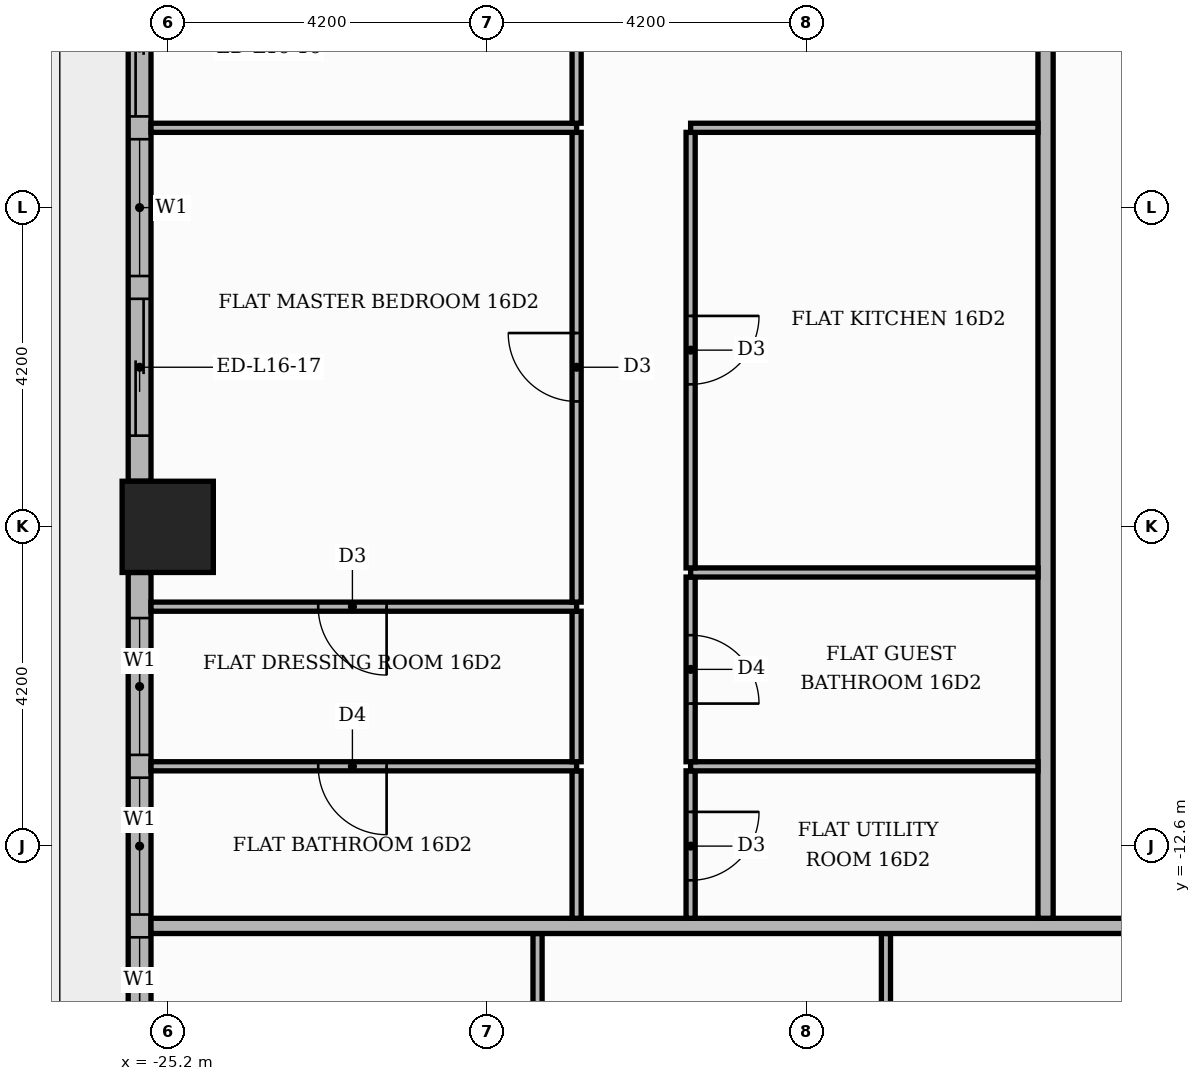
"""IFC4 building model, lengths in metres.
Left out: names, types, materials, properties, quantities, classifications, styles, units other than length and angle.
Written with IfcOpenShell. Run it as: python <this file> out.ifc"""

import sys

from ifc_helpers import new_model, si_unit, direction, frame, frame_2d, origin, origin_2d, place, context, subcontext, project, spatial, rectangle, extrude, element, fill, save


model = new_model("IFC4")
c1 = context("Model", 3, precision=1e-05, world=origin(), true_north=direction((0.0, 1.0)))
c2 = subcontext(c1, "Body", "Model", "MODEL_VIEW")
j1 = project(units=[si_unit("LENGTHUNIT", "METRE"), si_unit("PLANEANGLEUNIT", "RADIAN")], contexts=[c1])
p1 = place(None, origin())
s1 = spatial("IfcSite", under=j1, at=p1, CompositionType="ELEMENT")
p2 = place(p1, origin())
s2 = spatial("IfcBuilding", under=s1, at=p2, CompositionType="ELEMENT")
p3 = place(p2, frame((0.0, 0.0, 69.9)))
s3 = spatial("IfcBuildingStorey", under=s2, at=p3, CompositionType="ELEMENT", Elevation=69.9)
p4 = place(p3, frame((-25.2, -8.4, 0.0), z_axis=(0.0, 0.0, 1.0), x_axis=(1.0, 0.0, 0.0)))
e1 = element("IfcColumn", 1, at=p4, inside=s3, PredefinedType="COLUMN", context=c2, shape_type="SweptSolid", body=[
    extrude(rectangle(XDim=1.2, YDim=1.2, at=origin_2d()), origin(), (0.0, 0.0, 1.0), 3.9),
])
p5 = place(p3, frame((-25.57, -0.6, 0.0), z_axis=(0.0, 0.0, 1.0), x_axis=(0.0, -1.0, 0.0)))
e2 = element("IfcWall", 2, at=p5, inside=s3, PredefinedType="STANDARD", context=c2, shape_type="SweptSolid", body=[
    extrude(rectangle(XDim=7.2, YDim=0.3, at=frame_2d((3.6, 0.0))), origin(), (0.0, 0.0, 1.0), 3.4),
])
p6 = place(p5, frame((0.6, 0.0, 0.0)))
e3 = element("IfcOpeningElement", 3, at=p6, cuts=e2, PredefinedType="OPENING", context=c2, shape_type="SweptSolid", body=[
    extrude(rectangle(XDim=1.8, YDim=2.4, at=frame_2d((0.9, 1.2))), frame((0.0, 0.16, 0.0), z_axis=(0.0, -1.0, 0.0), x_axis=(1.0, 0.0, 0.0)), (0.0, 0.0, 1.0), 0.32),
])
p7 = place(p5, frame((2.7, 0.0, 0.9)))
e4 = element("IfcOpeningElement", 4, at=p7, cuts=e2, PredefinedType="OPENING", context=c2, shape_type="SweptSolid", body=[
    extrude(rectangle(XDim=1.8, YDim=2.1, at=frame_2d((0.9, 1.05))), frame((0.0, 0.16, 0.0), z_axis=(0.0, -1.0, 0.0), x_axis=(1.0, 0.0, 0.0)), (0.0, 0.0, 1.0), 0.32),
])
p8 = place(p5, frame((4.8, 0.0, 0.0)))
e5 = element("IfcOpeningElement", 5, at=p8, cuts=e2, PredefinedType="OPENING", context=c2, shape_type="SweptSolid", body=[
    extrude(rectangle(XDim=1.8, YDim=2.4, at=frame_2d((0.9, 1.2))), frame((0.0, 0.16, 0.0), z_axis=(0.0, -1.0, 0.0), x_axis=(1.0, 0.0, 0.0)), (0.0, 0.0, 1.0), 0.32),
])
p9 = place(p3, frame((-25.57, -9.0, 0.0), z_axis=(0.0, 0.0, 1.0), x_axis=(0.0, -1.0, 0.0)))
e6 = element("IfcWall", 6, at=p9, inside=s3, PredefinedType="STANDARD", context=c2, shape_type="SweptSolid", body=[
    extrude(rectangle(XDim=7.2, YDim=0.3, at=frame_2d((3.6, 0.0))), origin(), (0.0, 0.0, 1.0), 3.4),
])
p10 = place(p9, frame((0.6, 0.0, 0.9)))
e7 = element("IfcOpeningElement", 7, at=p10, cuts=e6, PredefinedType="OPENING", context=c2, shape_type="SweptSolid", body=[
    extrude(rectangle(XDim=1.8, YDim=2.1, at=frame_2d((0.9, 1.05))), frame((0.0, 0.16, 0.0), z_axis=(0.0, -1.0, 0.0), x_axis=(1.0, 0.0, 0.0)), (0.0, 0.0, 1.0), 0.32),
])
p11 = place(p9, frame((2.7, 0.0, 0.9)))
e8 = element("IfcOpeningElement", 8, at=p11, cuts=e6, PredefinedType="OPENING", context=c2, shape_type="SweptSolid", body=[
    extrude(rectangle(XDim=1.8, YDim=2.1, at=frame_2d((0.9, 1.05))), frame((0.0, 0.16, 0.0), z_axis=(0.0, -1.0, 0.0), x_axis=(1.0, 0.0, 0.0)), (0.0, 0.0, 1.0), 0.32),
])
p12 = place(p9, frame((4.8, 0.0, 0.9)))
e9 = element("IfcOpeningElement", 9, at=p12, cuts=e6, PredefinedType="OPENING", context=c2, shape_type="SweptSolid", body=[
    extrude(rectangle(XDim=1.8, YDim=2.1, at=frame_2d((0.9, 1.05))), frame((0.0, 0.16, 0.0), z_axis=(0.0, -1.0, 0.0), x_axis=(1.0, 0.0, 0.0)), (0.0, 0.0, 1.0), 0.32),
])
p13 = place(p3, frame((-20.334, -20.66, 0.0), z_axis=(0.0, 0.0, 1.0), x_axis=(0.0, 1.0, 0.0)))
e10 = element("IfcWall", 10, at=p13, inside=s3, PredefinedType="PARTITIONING", context=c2, shape_type="SweptSolid", body=[
    extrude(rectangle(XDim=6.91, YDim=0.12, at=frame_2d((3.455, 0.0))), origin(), (0.0, 0.0, 1.0), 3.4),
])
p14 = place(p13, frame((4.792, 0.0, 0.0)))
e11 = element("IfcOpeningElement", 11, at=p14, cuts=e10, PredefinedType="OPENING", context=c2, shape_type="SweptSolid", body=[
    extrude(rectangle(XDim=0.9, YDim=2.1, at=frame_2d((0.45, 1.05))), frame((0.0, 0.07, 0.0), z_axis=(0.0, -1.0, 0.0), x_axis=(1.0, 0.0, 0.0)), (0.0, 0.0, 1.0), 0.14),
])
p15 = place(p3, frame((-15.75, -20.66, 0.0), z_axis=(0.0, 0.0, 1.0), x_axis=(0.0, 1.0, 0.0)))
e12 = element("IfcWall", 12, at=p15, inside=s3, PredefinedType="PARTITIONING", context=c2, shape_type="SweptSolid", body=[
    extrude(rectangle(XDim=6.91, YDim=0.12, at=frame_2d((3.455, 0.0))), origin(), (0.0, 0.0, 1.0), 3.4),
])
p16 = place(p15, frame((2.975, 0.0, 0.0)))
e13 = element("IfcOpeningElement", 13, at=p16, cuts=e12, PredefinedType="OPENING", context=c2, shape_type="SweptSolid", body=[
    extrude(rectangle(XDim=1.0, YDim=2.1, at=frame_2d((0.5, 1.05))), frame((0.0, 0.07, 0.0), z_axis=(0.0, -1.0, 0.0), x_axis=(1.0, 0.0, 0.0)), (0.0, 0.0, 1.0), 0.14),
])
p17 = place(p3, frame((-25.42, -13.65, 0.0), z_axis=(0.0, 0.0, 1.0), x_axis=(1.0, 0.0, 0.0)))
e14 = element("IfcWall", 14, at=p17, inside=s3, PredefinedType="PARTITIONING", context=c2, shape_type="SweptSolid", body=[
    extrude(rectangle(XDim=39.07, YDim=0.2, at=frame_2d((19.535, 0.0))), origin(), (0.0, 0.0, 1.0), 3.4),
])
p18 = place(p17, frame((13.32, 0.0, 0.0)))
e15 = element("IfcOpeningElement", 15, at=p18, cuts=e14, PredefinedType="OPENING", context=c2, shape_type="SweptSolid", body=[
    extrude(rectangle(XDim=1.1, YDim=2.4, at=frame_2d((0.55, 1.2))), frame((0.0, 0.11, 0.0), z_axis=(0.0, -1.0, 0.0), x_axis=(1.0, 0.0, 0.0)), (0.0, 0.0, 1.0), 0.22),
])
p19 = place(p17, frame((21.72, 0.0, 0.0)))
e16 = element("IfcOpeningElement", 16, at=p19, cuts=e14, PredefinedType="OPENING", context=c2, shape_type="SweptSolid", body=[
    extrude(rectangle(XDim=1.1, YDim=2.4, at=frame_2d((0.55, 1.2))), frame((0.0, 0.11, 0.0), z_axis=(0.0, -1.0, 0.0), x_axis=(1.0, 0.0, 0.0)), (0.0, 0.0, 1.0), 0.22),
])
p20 = place(p3, frame((-19.82, -13.55, 0.0), z_axis=(0.0, 0.0, 1.0), x_axis=(0.0, 1.0, 0.0)))
e17 = element("IfcWall", 17, at=p20, inside=s3, PredefinedType="PARTITIONING", context=c2, shape_type="SweptSolid", body=[
    extrude(rectangle(XDim=1.94, YDim=0.12, at=frame_2d((0.97, 0.0))), origin(), (0.0, 0.0, 1.0), 3.4),
])
p21 = place(p3, frame((-18.32, -13.55, 0.0), z_axis=(0.0, 0.0, 1.0), x_axis=(0.0, 1.0, 0.0)))
e18 = element("IfcWall", 18, at=p21, inside=s3, PredefinedType="PARTITIONING", context=c2, shape_type="SweptSolid", body=[
    extrude(rectangle(XDim=1.94, YDim=0.12, at=frame_2d((0.97, 0.0))), origin(), (0.0, 0.0, 1.0), 3.4),
])
p22 = place(p21, frame((0.5, 0.0, 0.0)))
e19 = element("IfcOpeningElement", 19, at=p22, cuts=e18, PredefinedType="OPENING", context=c2, shape_type="SweptSolid", body=[
    extrude(rectangle(XDim=0.9, YDim=2.1, at=frame_2d((0.45, 1.05))), frame((0.0, 0.07, 0.0), z_axis=(0.0, -1.0, 0.0), x_axis=(1.0, 0.0, 0.0)), (0.0, 0.0, 1.0), 0.14),
])
p23 = place(p3, frame((-13.65, -13.55, 0.0), z_axis=(0.0, 0.0, 1.0), x_axis=(0.0, 1.0, 0.0)))
e20 = element("IfcWall", 20, at=p23, inside=s3, PredefinedType="PARTITIONING", context=c2, shape_type="SweptSolid", body=[
    extrude(rectangle(XDim=18.7, YDim=0.2, at=frame_2d((9.35, 0.0))), origin(), (0.0, 0.0, 1.0), 3.4),
])
p24 = place(p23, frame((11.95, 0.0, 0.0)))
e21 = element("IfcOpeningElement", 21, at=p24, cuts=e20, PredefinedType="OPENING", context=c2, shape_type="SweptSolid", body=[
    extrude(rectangle(XDim=1.1, YDim=2.4, at=frame_2d((0.55, 1.2))), frame((0.0, 0.11, 0.0), z_axis=(0.0, -1.0, 0.0), x_axis=(1.0, 0.0, 0.0)), (0.0, 0.0, 1.0), 0.22),
])
p25 = place(p3, frame((-25.42, -11.55, 0.0), z_axis=(0.0, 0.0, 1.0), x_axis=(1.0, 0.0, 0.0)))
e22 = element("IfcWall", 22, at=p25, inside=s3, PredefinedType="PARTITIONING", context=c2, shape_type="SweptSolid", body=[
    extrude(rectangle(XDim=5.6, YDim=0.12, at=frame_2d((2.8, 0.0))), origin(), (0.0, 0.0, 1.0), 3.4),
])
p26 = place(p25, frame((2.2, 0.0, 0.0)))
e23 = element("IfcOpeningElement", 23, at=p26, cuts=e22, PredefinedType="OPENING", context=c2, shape_type="SweptSolid", body=[
    extrude(rectangle(XDim=0.9, YDim=2.1, at=frame_2d((0.45, 1.05))), frame((0.0, 0.07, 0.0), z_axis=(0.0, -1.0, 0.0), x_axis=(1.0, 0.0, 0.0)), (0.0, 0.0, 1.0), 0.14),
])
p27 = place(p3, frame((-18.32, -11.55, 0.0), z_axis=(0.0, 0.0, 1.0), x_axis=(1.0, 0.0, 0.0)))
e24 = element("IfcWall", 24, at=p27, inside=s3, PredefinedType="PARTITIONING", context=c2, shape_type="SweptSolid", body=[
    extrude(rectangle(XDim=4.57, YDim=0.12, at=frame_2d((2.285, 0.0))), origin(), (0.0, 0.0, 1.0), 3.4),
])
p28 = place(p3, frame((-19.82, -11.49, 0.0), z_axis=(0.0, 0.0, 1.0), x_axis=(0.0, 1.0, 0.0)))
e25 = element("IfcWall", 25, at=p28, inside=s3, PredefinedType="PARTITIONING", context=c2, shape_type="SweptSolid", body=[
    extrude(rectangle(XDim=1.98, YDim=0.12, at=frame_2d((0.99, 0.0))), origin(), (0.0, 0.0, 1.0), 3.4),
])
p29 = place(p3, frame((-18.32, -11.49, 0.0), z_axis=(0.0, 0.0, 1.0), x_axis=(0.0, 1.0, 0.0)))
e26 = element("IfcWall", 26, at=p29, inside=s3, PredefinedType="PARTITIONING", context=c2, shape_type="SweptSolid", body=[
    extrude(rectangle(XDim=2.43, YDim=0.12, at=frame_2d((1.215, 0.0))), origin(), (0.0, 0.0, 1.0), 3.4),
])
p30 = place(p29, frame((0.765, 0.0, 0.0)))
e27 = element("IfcOpeningElement", 27, at=p30, cuts=e26, PredefinedType="OPENING", context=c2, shape_type="SweptSolid", body=[
    extrude(rectangle(XDim=0.9, YDim=2.1, at=frame_2d((0.45, 1.05))), frame((0.0, 0.07, 0.0), z_axis=(0.0, -1.0, 0.0), x_axis=(1.0, 0.0, 0.0)), (0.0, 0.0, 1.0), 0.14),
])
p31 = place(p3, frame((-25.42, -9.45, 0.0), z_axis=(0.0, 0.0, 1.0), x_axis=(1.0, 0.0, 0.0)))
e28 = element("IfcWall", 28, at=p31, inside=s3, PredefinedType="PARTITIONING", context=c2, shape_type="SweptSolid", body=[
    extrude(rectangle(XDim=5.6, YDim=0.12, at=frame_2d((2.8, 0.0))), origin(), (0.0, 0.0, 1.0), 3.4),
])
p32 = place(p31, frame((2.2, 0.0, 0.0)))
e29 = element("IfcOpeningElement", 29, at=p32, cuts=e28, PredefinedType="OPENING", context=c2, shape_type="SweptSolid", body=[
    extrude(rectangle(XDim=0.9, YDim=2.1, at=frame_2d((0.45, 1.05))), frame((0.0, 0.07, 0.0), z_axis=(0.0, -1.0, 0.0), x_axis=(1.0, 0.0, 0.0)), (0.0, 0.0, 1.0), 0.14),
])
p33 = place(p3, frame((-19.82, -9.39, 0.0), z_axis=(0.0, 0.0, 1.0), x_axis=(0.0, 1.0, 0.0)))
e30 = element("IfcWall", 30, at=p33, inside=s3, PredefinedType="PARTITIONING", context=c2, shape_type="SweptSolid", body=[
    extrude(rectangle(XDim=6.18, YDim=0.12, at=frame_2d((3.09, 0.0))), origin(), (0.0, 0.0, 1.0), 3.4),
])
p34 = place(p33, frame((2.64, 0.0, 0.0)))
e31 = element("IfcOpeningElement", 31, at=p34, cuts=e30, PredefinedType="OPENING", context=c2, shape_type="SweptSolid", body=[
    extrude(rectangle(XDim=0.9, YDim=2.1, at=frame_2d((0.45, 1.05))), frame((0.0, 0.07, 0.0), z_axis=(0.0, -1.0, 0.0), x_axis=(1.0, 0.0, 0.0)), (0.0, 0.0, 1.0), 0.14),
])
p35 = place(p3, frame((-18.32, -9.0, 0.0), z_axis=(0.0, 0.0, 1.0), x_axis=(1.0, 0.0, 0.0)))
e32 = element("IfcWall", 32, at=p35, inside=s3, PredefinedType="PARTITIONING", context=c2, shape_type="SweptSolid", body=[
    extrude(rectangle(XDim=4.57, YDim=0.12, at=frame_2d((2.285, 0.0))), origin(), (0.0, 0.0, 1.0), 3.4),
])
p36 = place(p3, frame((-18.32, -8.94, 0.0), z_axis=(0.0, 0.0, 1.0), x_axis=(0.0, 1.0, 0.0)))
e33 = element("IfcWall", 33, at=p36, inside=s3, PredefinedType="PARTITIONING", context=c2, shape_type="SweptSolid", body=[
    extrude(rectangle(XDim=5.73, YDim=0.12, at=frame_2d((2.865, 0.0))), origin(), (0.0, 0.0, 1.0), 3.4),
])
p37 = place(p36, frame((2.415, 0.0, 0.0)))
e34 = element("IfcOpeningElement", 34, at=p37, cuts=e33, PredefinedType="OPENING", context=c2, shape_type="SweptSolid", body=[
    extrude(rectangle(XDim=0.9, YDim=2.1, at=frame_2d((0.45, 1.05))), frame((0.0, 0.07, 0.0), z_axis=(0.0, -1.0, 0.0), x_axis=(1.0, 0.0, 0.0)), (0.0, 0.0, 1.0), 0.14),
])
p38 = place(p3, frame((-25.42, -3.15, 0.0), z_axis=(0.0, 0.0, 1.0), x_axis=(1.0, 0.0, 0.0)))
e35 = element("IfcWall", 35, at=p38, inside=s3, PredefinedType="PARTITIONING", context=c2, shape_type="SweptSolid", body=[
    extrude(rectangle(XDim=5.6, YDim=0.12, at=frame_2d((2.8, 0.0))), origin(), (0.0, 0.0, 1.0), 3.4),
])
p39 = place(p3, frame((-18.32, -3.15, 0.0), z_axis=(0.0, 0.0, 1.0), x_axis=(1.0, 0.0, 0.0)))
e36 = element("IfcWall", 36, at=p39, inside=s3, PredefinedType="PARTITIONING", context=c2, shape_type="SweptSolid", body=[
    extrude(rectangle(XDim=4.57, YDim=0.12, at=frame_2d((2.285, 0.0))), origin(), (0.0, 0.0, 1.0), 3.4),
])
p40 = place(p3, frame((-19.82, -3.09, 0.0), z_axis=(0.0, 0.0, 1.0), x_axis=(0.0, 1.0, 0.0)))
e37 = element("IfcWall", 37, at=p40, inside=s3, PredefinedType="PARTITIONING", context=c2, shape_type="SweptSolid", body=[
    extrude(rectangle(XDim=8.24, YDim=0.12, at=frame_2d((4.12, 0.0))), origin(), (0.0, 0.0, 1.0), 3.4),
])
p41 = place(p40, frame((3.64, 0.0, 0.0)))
e38 = element("IfcOpeningElement", 38, at=p41, cuts=e37, PredefinedType="OPENING", context=c2, shape_type="SweptSolid", body=[
    extrude(rectangle(XDim=1.0, YDim=2.1, at=frame_2d((0.5, 1.05))), frame((0.0, 0.07, 0.0), z_axis=(0.0, -1.0, 0.0), x_axis=(1.0, 0.0, 0.0)), (0.0, 0.0, 1.0), 0.14),
])
p42 = place(p6, origin())
e39 = element("IfcDoor", 39, at=p42, inside=s3, OperationType="SLIDING_TO_LEFT", PredefinedType="DOOR", context=c2, shape_type="SweptSolid", body=[
    extrude(rectangle(XDim=1.8, YDim=2.4, at=frame_2d((0.9, 1.2))), frame((0.0, 0.025, 0.0), z_axis=(0.0, -1.0, 0.0), x_axis=(1.0, 0.0, 0.0)), (0.0, 0.0, 1.0), 0.05),
])
fill(e3, e39)
p43 = place(p7, origin())
e40 = element("IfcWindow", 40, at=p43, inside=s3, PartitioningType="SINGLE_PANEL", PredefinedType="WINDOW", context=c2, shape_type="SweptSolid", body=[
    extrude(rectangle(XDim=1.8, YDim=2.1, at=frame_2d((0.9, 1.05))), frame((0.0, 0.03, 0.0), z_axis=(0.0, -1.0, 0.0), x_axis=(1.0, 0.0, 0.0)), (0.0, 0.0, 1.0), 0.06),
])
fill(e4, e40)
p44 = place(p8, origin())
e41 = element("IfcDoor", 41, at=p44, inside=s3, OperationType="SLIDING_TO_RIGHT", PredefinedType="DOOR", context=c2, shape_type="SweptSolid", body=[
    extrude(rectangle(XDim=1.8, YDim=2.4, at=frame_2d((0.9, 1.2))), frame((0.0, 0.025, 0.0), z_axis=(0.0, -1.0, 0.0), x_axis=(1.0, 0.0, 0.0)), (0.0, 0.0, 1.0), 0.05),
])
fill(e5, e41)
p45 = place(p10, origin())
e42 = element("IfcWindow", 42, at=p45, inside=s3, PartitioningType="SINGLE_PANEL", PredefinedType="WINDOW", context=c2, shape_type="SweptSolid", body=[
    extrude(rectangle(XDim=1.8, YDim=2.1, at=frame_2d((0.9, 1.05))), frame((0.0, 0.03, 0.0), z_axis=(0.0, -1.0, 0.0), x_axis=(1.0, 0.0, 0.0)), (0.0, 0.0, 1.0), 0.06),
])
fill(e7, e42)
p46 = place(p11, origin())
e43 = element("IfcWindow", 43, at=p46, inside=s3, PartitioningType="SINGLE_PANEL", PredefinedType="WINDOW", context=c2, shape_type="SweptSolid", body=[
    extrude(rectangle(XDim=1.8, YDim=2.1, at=frame_2d((0.9, 1.05))), frame((0.0, 0.03, 0.0), z_axis=(0.0, -1.0, 0.0), x_axis=(1.0, 0.0, 0.0)), (0.0, 0.0, 1.0), 0.06),
])
fill(e8, e43)
p47 = place(p12, origin())
e44 = element("IfcWindow", 44, at=p47, inside=s3, PartitioningType="SINGLE_PANEL", PredefinedType="WINDOW", context=c2, shape_type="SweptSolid", body=[
    extrude(rectangle(XDim=1.8, YDim=2.1, at=frame_2d((0.9, 1.05))), frame((0.0, 0.03, 0.0), z_axis=(0.0, -1.0, 0.0), x_axis=(1.0, 0.0, 0.0)), (0.0, 0.0, 1.0), 0.06),
])
fill(e9, e44)
p48 = place(p37, frame((0.9, 0.0, 0.0), z_axis=(0.0, 0.0, 1.0), x_axis=(-1.0, 0.0, 0.0)))
e45 = element("IfcDoor", 45, at=p48, inside=s3, OperationType="SINGLE_SWING_RIGHT", PredefinedType="DOOR", context=c2, shape_type="SweptSolid", body=[
    extrude(rectangle(XDim=0.9, YDim=2.1, at=frame_2d((0.45, 1.05))), frame((0.0, 0.025, 0.0), z_axis=(0.0, -1.0, 0.0), x_axis=(1.0, 0.0, 0.0)), (0.0, 0.0, 1.0), 0.05),
])
fill(e34, e45)
p49 = place(p30, frame((0.9, 0.0, 0.0), z_axis=(0.0, 0.0, 1.0), x_axis=(-1.0, 0.0, 0.0)))
e46 = element("IfcDoor", 46, at=p49, inside=s3, OperationType="SINGLE_SWING_LEFT", PredefinedType="DOOR", context=c2, shape_type="SweptSolid", body=[
    extrude(rectangle(XDim=0.9, YDim=2.1, at=frame_2d((0.45, 1.05))), frame((0.0, 0.025, 0.0), z_axis=(0.0, -1.0, 0.0), x_axis=(1.0, 0.0, 0.0)), (0.0, 0.0, 1.0), 0.05),
])
fill(e27, e46)
p50 = place(p22, frame((0.9, 0.0, 0.0), z_axis=(0.0, 0.0, 1.0), x_axis=(-1.0, 0.0, 0.0)))
e47 = element("IfcDoor", 47, at=p50, inside=s3, OperationType="SINGLE_SWING_RIGHT", PredefinedType="DOOR", context=c2, shape_type="SweptSolid", body=[
    extrude(rectangle(XDim=0.9, YDim=2.1, at=frame_2d((0.45, 1.05))), frame((0.0, 0.025, 0.0), z_axis=(0.0, -1.0, 0.0), x_axis=(1.0, 0.0, 0.0)), (0.0, 0.0, 1.0), 0.05),
])
fill(e19, e47)
p51 = place(p34, origin())
e48 = element("IfcDoor", 48, at=p51, inside=s3, OperationType="SINGLE_SWING_RIGHT", PredefinedType="DOOR", context=c2, shape_type="SweptSolid", body=[
    extrude(rectangle(XDim=0.9, YDim=2.1, at=frame_2d((0.45, 1.05))), frame((0.0, 0.025, 0.0), z_axis=(0.0, -1.0, 0.0), x_axis=(1.0, 0.0, 0.0)), (0.0, 0.0, 1.0), 0.05),
])
fill(e31, e48)
p52 = place(p32, frame((0.9, 0.0, 0.0), z_axis=(0.0, 0.0, 1.0), x_axis=(-1.0, 0.0, 0.0)))
e49 = element("IfcDoor", 49, at=p52, inside=s3, OperationType="SINGLE_SWING_RIGHT", PredefinedType="DOOR", context=c2, shape_type="SweptSolid", body=[
    extrude(rectangle(XDim=0.9, YDim=2.1, at=frame_2d((0.45, 1.05))), frame((0.0, 0.025, 0.0), z_axis=(0.0, -1.0, 0.0), x_axis=(1.0, 0.0, 0.0)), (0.0, 0.0, 1.0), 0.05),
])
fill(e29, e49)
p53 = place(p26, frame((0.9, 0.0, 0.0), z_axis=(0.0, 0.0, 1.0), x_axis=(-1.0, 0.0, 0.0)))
e50 = element("IfcDoor", 50, at=p53, inside=s3, OperationType="SINGLE_SWING_RIGHT", PredefinedType="DOOR", context=c2, shape_type="SweptSolid", body=[
    extrude(rectangle(XDim=0.9, YDim=2.1, at=frame_2d((0.45, 1.05))), frame((0.0, 0.025, 0.0), z_axis=(0.0, -1.0, 0.0), x_axis=(1.0, 0.0, 0.0)), (0.0, 0.0, 1.0), 0.05),
])
fill(e23, e50)
save(model, sys.argv[1])
